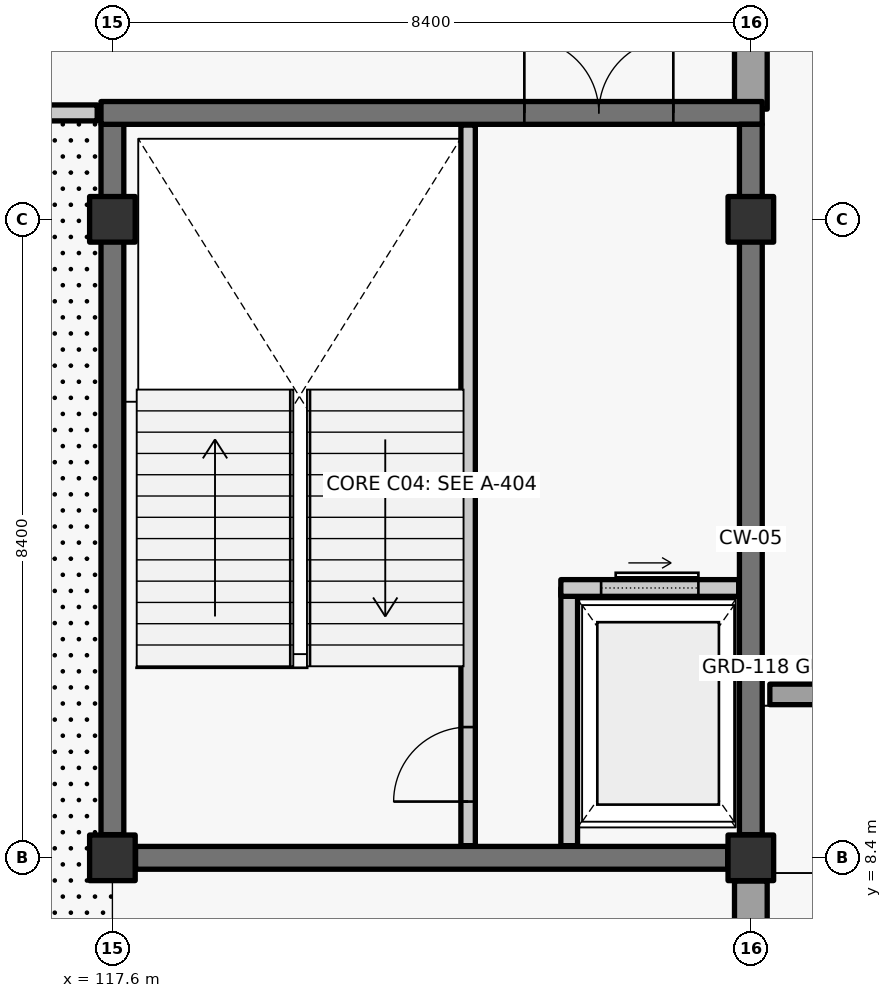
"""IFC4 building model, lengths in metres.
Left out: names, types, materials, properties, quantities, classifications, styles, units other than length and angle.
Written with IfcOpenShell. Run it as: python <this file> out.ifc"""

import sys

from ifc_helpers import new_model, si_unit, direction, frame, frame_2d, origin, origin_2d, place, context, subcontext, project, spatial, rectangle, extrude, element, fill, save


model = new_model("IFC4")
c1 = context("Model", 3, precision=1e-05, world=origin(), true_north=direction((0.0, 1.0)))
c2 = subcontext(c1, "Body", "Model", "MODEL_VIEW")
j1 = project(units=[si_unit("LENGTHUNIT", "METRE"), si_unit("PLANEANGLEUNIT", "RADIAN")], contexts=[c1])
p1 = place(None, origin())
s1 = spatial("IfcSite", under=j1, at=p1, CompositionType="ELEMENT")
p2 = place(p1, origin())
s2 = spatial("IfcBuilding", under=s1, at=p2, CompositionType="ELEMENT")
p3 = place(p2, frame((0.0, 0.0, 16.2)))
s3 = spatial("IfcBuildingStorey", under=s2, at=p3, CompositionType="ELEMENT", Elevation=16.2)
for number, where, z_axis, x_axis in (
    (1, (117.6, 8.4, 0.0), (0.0, 0.0, 1.0), (1.0, 0.0, 0.0)),
    (2, (117.6, 16.8, 0.0), (0.0, 0.0, 1.0), (1.0, 0.0, 0.0)),
    (3, (126.0, 8.4, 0.0), (0.0, 0.0, 1.0), (1.0, 0.0, 0.0)),
    (4, (126.0, 16.8, 0.0), (0.0, 0.0, 1.0), (1.0, 0.0, 0.0)),
):
    element("IfcColumn", number, at=place(p3, frame(where, z_axis=z_axis, x_axis=x_axis)), inside=s3, PredefinedType="COLUMN", context=c2, shape_type="SweptSolid", body=[
        extrude(rectangle(XDim=0.6, YDim=0.6, at=origin_2d()), origin(), (0.0, 0.0, 1.0), 4.26),
    ])
p4 = place(p3, frame((126.0, 8.095, 0.0), z_axis=(0.0, 0.0, 1.0), x_axis=(0.0, -1.0, 0.0)))
e5 = element("IfcWall", 5, at=p4, inside=s3, PredefinedType="SOLIDWALL", context=c2, shape_type="SweptSolid", body=[
    extrude(rectangle(XDim=7.815, YDim=0.43, at=frame_2d((3.907, 0.0))), origin(), (0.0, 0.0, 1.0), 4.26),
])
p5 = place(p4, frame((2.145, 0.0, 0.9)))
e6 = element("IfcOpeningElement", 6, at=p5, cuts=e5, PredefinedType="OPENING", context=c2, shape_type="SweptSolid", body=[
    extrude(rectangle(XDim=3.5, YDim=2.05, at=frame_2d((1.75, 1.025))), frame((0.0, 0.225, 0.0), z_axis=(0.0, -1.0, 0.0), x_axis=(1.0, 0.0, 0.0)), (0.0, 0.0, 1.0), 0.45),
])
p6 = place(p3, frame((126.0, 24.895, 0.0), z_axis=(0.0, 0.0, 1.0), x_axis=(0.0, -1.0, 0.0)))
e7 = element("IfcWall", 7, at=p6, inside=s3, PredefinedType="SOLIDWALL", context=c2, shape_type="SweptSolid", body=[
    extrude(rectangle(XDim=6.645, YDim=0.43, at=frame_2d((3.323, 0.0))), origin(), (0.0, 0.0, 1.0), 4.26),
])
p7 = place(p6, frame((2.585, 0.0, 0.0)))
e8 = element("IfcOpeningElement", 8, at=p7, cuts=e7, PredefinedType="OPENING", context=c2, shape_type="SweptSolid", body=[
    extrude(rectangle(XDim=1.62, YDim=2.26, at=frame_2d((0.81, 1.13))), frame((0.0, 0.225, 0.0), z_axis=(0.0, -1.0, 0.0), x_axis=(1.0, 0.0, 0.0)), (0.0, 0.0, 1.0), 0.45),
])
p8 = place(p3, frame((126.25, 10.55, 0.0), z_axis=(0.0, 0.0, 1.0), x_axis=(1.0, 0.0, 0.0)))
e9 = element("IfcWall", 9, at=p8, inside=s3, PredefinedType="PARAPET", context=c2, shape_type="SweptSolid", body=[
    extrude(rectangle(XDim=16.25, YDim=0.27, at=frame_2d((8.125, 0.0))), origin(), (0.0, 0.0, 1.0), 1.1),
])
p9 = place(p3, frame((125.695, 8.4, 0.0), z_axis=(0.0, 0.0, 1.0), x_axis=(-1.0, 0.0, 0.0)))
e10 = element("IfcWall", 10, at=p9, inside=s3, PredefinedType="SHEAR", context=c2, shape_type="SweptSolid", body=[
    extrude(rectangle(XDim=7.79, YDim=0.3, at=frame_2d((3.895, 0.0))), origin(), (0.0, 0.0, 1.0), 4.26),
])
p10 = place(p3, frame((117.6, 8.705, 0.0), z_axis=(0.0, 0.0, 1.0), x_axis=(0.0, 1.0, 0.0)))
e11 = element("IfcWall", 11, at=p10, inside=s3, PredefinedType="SHEAR", context=c2, shape_type="SweptSolid", body=[
    extrude(rectangle(XDim=9.345, YDim=0.3, at=frame_2d((4.672, 0.0))), origin(), (0.0, 0.0, 1.0), 4.26),
])
p11 = place(p3, frame((117.45, 18.2, 0.0), z_axis=(0.0, 0.0, 1.0), x_axis=(1.0, 0.0, 0.0)))
e12 = element("IfcWall", 12, at=p11, inside=s3, PredefinedType="SHEAR", context=c2, shape_type="SweptSolid", body=[
    extrude(rectangle(XDim=8.7, YDim=0.3, at=frame_2d((4.35, 0.0))), origin(), (0.0, 0.0, 1.0), 4.26),
])
p12 = place(p11, frame((5.57, 0.0, 0.0)))
e13 = element("IfcOpeningElement", 13, at=p12, cuts=e12, PredefinedType="OPENING", context=c2, shape_type="SweptSolid", body=[
    extrude(rectangle(XDim=1.96, YDim=2.2, at=frame_2d((0.98, 1.1))), frame((0.0, 0.16, 0.0), z_axis=(0.0, -1.0, 0.0), x_axis=(1.0, 0.0, 0.0)), (0.0, 0.0, 1.0), 0.32),
])
p13 = place(p3, frame((126.0, 18.05, 0.0), z_axis=(0.0, 0.0, 1.0), x_axis=(0.0, -1.0, 0.0)))
e14 = element("IfcWall", 14, at=p13, inside=s3, PredefinedType="SHEAR", context=c2, shape_type="SweptSolid", body=[
    extrude(rectangle(XDim=9.345, YDim=0.3, at=frame_2d((4.672, 0.0))), origin(), (0.0, 0.0, 1.0), 4.26),
])
p14 = place(p3, frame((122.28, 8.56, 0.0), z_axis=(0.0, 0.0, 1.0), x_axis=(0.0, 1.0, 0.0)))
e15 = element("IfcWall", 15, at=p14, inside=s3, PredefinedType="SOLIDWALL", context=c2, shape_type="SweptSolid", body=[
    extrude(rectangle(XDim=9.48, YDim=0.19, at=frame_2d((4.74, 0.0))), origin(), (0.0, 0.0, 1.0), 4.26),
])
p15 = place(p14, frame((0.58, 0.0, 0.0)))
e16 = element("IfcOpeningElement", 16, at=p15, cuts=e15, PredefinedType="OPENING", context=c2, shape_type="SweptSolid", body=[
    extrude(rectangle(XDim=0.98, YDim=2.15, at=frame_2d((0.49, 1.075))), frame((0.0, 0.105, 0.0), z_axis=(0.0, -1.0, 0.0), x_axis=(1.0, 0.0, 0.0)), (0.0, 0.0, 1.0), 0.21),
])
p16 = place(p3, frame((123.61, 8.56, 0.0), z_axis=(0.0, 0.0, 1.0), x_axis=(0.0, 1.0, 0.0)))
e17 = element("IfcWall", 17, at=p16, inside=s3, PredefinedType="SOLIDWALL", context=c2, shape_type="SweptSolid", body=[
    extrude(rectangle(XDim=3.39, YDim=0.22, at=frame_2d((1.695, 0.0))), origin(), (0.0, 0.0, 1.0), 4.26),
])
p17 = place(p3, frame((123.5, 11.95, 0.0), z_axis=(0.0, 0.0, 1.0), x_axis=(1.0, 0.0, 0.0)))
e18 = element("IfcWall", 18, at=p17, inside=s3, PredefinedType="SOLIDWALL", context=c2, shape_type="SweptSolid", body=[
    extrude(rectangle(XDim=2.34, YDim=0.22, at=frame_2d((1.17, 0.0))), origin(), (0.0, 0.0, 1.0), 4.26),
])
p18 = place(p17, frame((0.53, 0.0, 0.0)))
e19 = element("IfcOpeningElement", 19, at=p18, cuts=e18, PredefinedType="OPENING", context=c2, shape_type="SweptSolid", body=[
    extrude(rectangle(XDim=1.28, YDim=2.25, at=frame_2d((0.64, 1.125))), frame((0.0, 0.12, 0.0), z_axis=(0.0, -1.0, 0.0), x_axis=(1.0, 0.0, 0.0)), (0.0, 0.0, 1.0), 0.24),
])
p19 = place(p3, frame((101.0, 18.2, 0.0), z_axis=(0.0, 0.0, 1.0), x_axis=(1.0, 0.0, 0.0)))
e20 = element("IfcWall", 20, at=p19, inside=s3, PredefinedType="PARTITIONING", context=c2, shape_type="SweptSolid", body=[
    extrude(rectangle(XDim=16.4, YDim=0.21, at=frame_2d((8.2, 0.0))), origin(), (0.0, 0.0, 1.0), 4.26),
])
p20 = place(p19, frame((3.24, 0.0, 0.0)))
e21 = element("IfcOpeningElement", 21, at=p20, cuts=e20, PredefinedType="OPENING", context=c2, shape_type="SweptSolid", body=[
    extrude(rectangle(XDim=1.52, YDim=2.18, at=frame_2d((0.76, 1.09))), frame((0.0, 0.115, 0.0), z_axis=(0.0, -1.0, 0.0), x_axis=(1.0, 0.0, 0.0)), (0.0, 0.0, 1.0), 0.23),
])
p21 = place(p19, frame((11.64, 0.0, 0.0)))
e22 = element("IfcOpeningElement", 22, at=p21, cuts=e20, PredefinedType="OPENING", context=c2, shape_type="SweptSolid", body=[
    extrude(rectangle(XDim=1.52, YDim=2.18, at=frame_2d((0.76, 1.09))), frame((0.0, 0.115, 0.0), z_axis=(0.0, -1.0, 0.0), x_axis=(1.0, 0.0, 0.0)), (0.0, 0.0, 1.0), 0.23),
])
p22 = place(p15, origin())
e23 = element("IfcDoor", 23, at=p22, inside=s3, OperationType="SINGLE_SWING_LEFT", PredefinedType="DOOR", context=c2, shape_type="SweptSolid", body=[
    extrude(rectangle(XDim=0.98, YDim=2.15, at=frame_2d((0.49, 1.075))), frame((0.0, 0.025, 0.0), z_axis=(0.0, -1.0, 0.0), x_axis=(1.0, 0.0, 0.0)), (0.0, 0.0, 1.0), 0.05),
])
fill(e16, e23)
p23 = place(p12, origin())
e24 = element("IfcDoor", 24, at=p23, inside=s3, OperationType="DOUBLE_DOOR_SINGLE_SWING", PredefinedType="DOOR", context=c2, shape_type="SweptSolid", body=[
    extrude(rectangle(XDim=1.96, YDim=2.2, at=frame_2d((0.98, 1.1))), frame((0.0, 0.025, 0.0), z_axis=(0.0, -1.0, 0.0), x_axis=(1.0, 0.0, 0.0)), (0.0, 0.0, 1.0), 0.05),
])
fill(e13, e24)
p24 = place(p18, origin())
e25 = element("IfcDoor", 25, at=p24, inside=s3, OperationType="SLIDING_TO_RIGHT", PredefinedType="DOOR", context=c2, shape_type="SweptSolid", body=[
    extrude(rectangle(XDim=1.28, YDim=2.25, at=frame_2d((0.64, 1.125))), frame((0.0, 0.025, 0.0), z_axis=(0.0, -1.0, 0.0), x_axis=(1.0, 0.0, 0.0)), (0.0, 0.0, 1.0), 0.05),
])
fill(e19, e25)
save(model, sys.argv[1])
